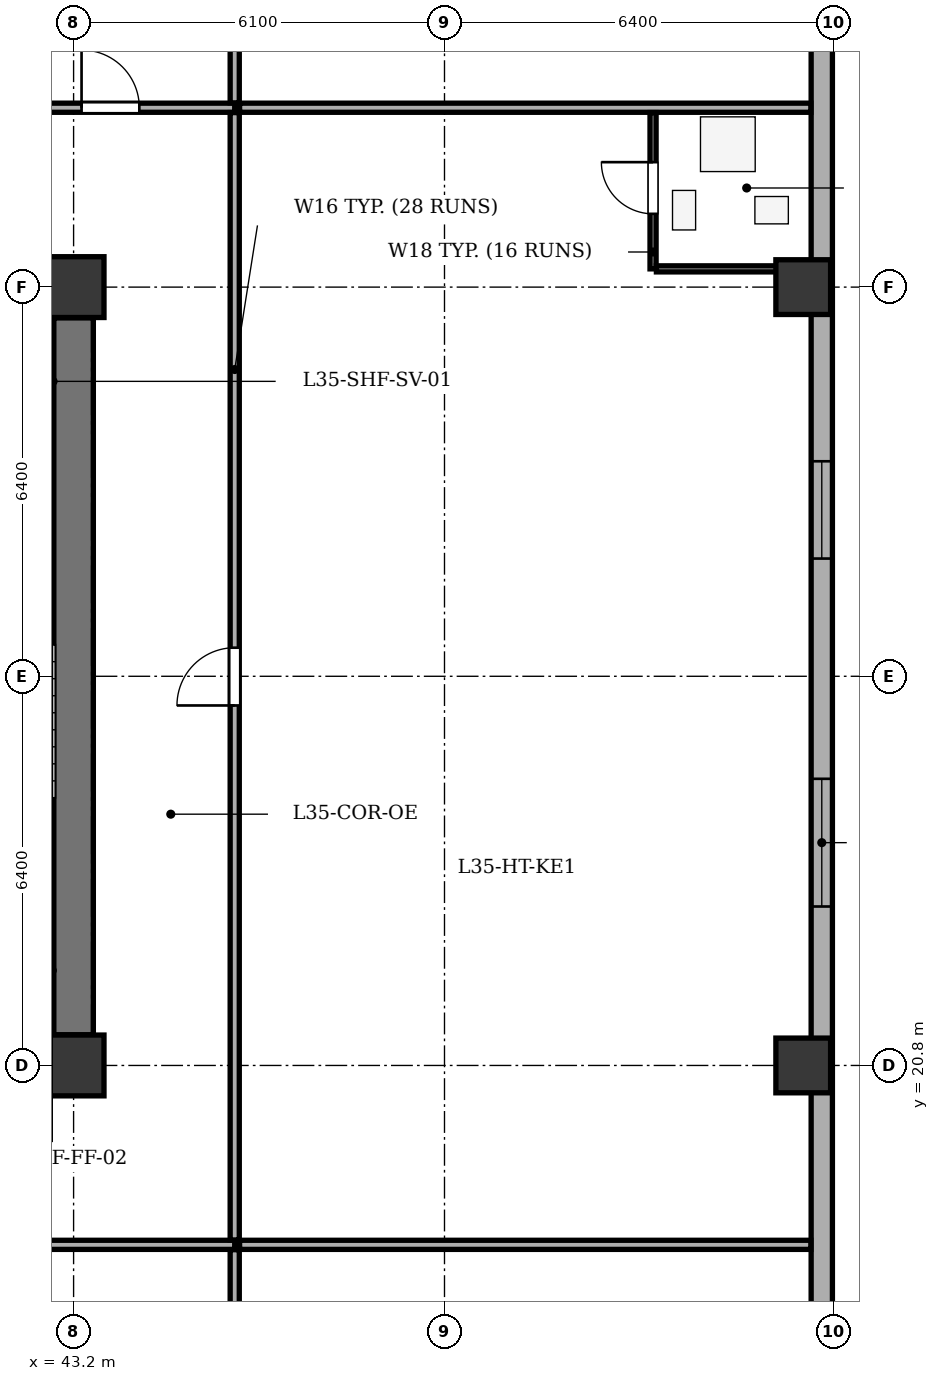
"""IFC4 building model, lengths in metres.
Left out: names, types, materials, properties, quantities, classifications, styles, units other than length and angle.
Written with IfcOpenShell. Run it as: python <this file> out.ifc"""

import sys

from ifc_helpers import new_model, si_unit, direction, frame, frame_2d, origin, origin_2d, place, context, subcontext, project, spatial, rectangle, extrude, element, fill, save


model = new_model("IFC4")
c1 = context("Model", 3, precision=1e-05, world=origin(), true_north=direction((0.0, 1.0)))
c2 = subcontext(c1, "Body", "Model", "MODEL_VIEW")
j1 = project(units=[si_unit("LENGTHUNIT", "METRE"), si_unit("PLANEANGLEUNIT", "RADIAN")], contexts=[c1])
p1 = place(None, origin())
s1 = spatial("IfcSite", under=j1, at=p1, CompositionType="ELEMENT")
p2 = place(p1, origin())
s2 = spatial("IfcBuilding", under=s1, at=p2, CompositionType="ELEMENT")
p3 = place(p2, frame((0.0, 0.0, 141.3)))
s3 = spatial("IfcBuildingStorey", under=s2, at=p3, CompositionType="ELEMENT", Elevation=141.3)
for number, where, z_axis, x_axis in (
    (1, (43.2, 20.8, 0.0), (0.0, 0.0, 1.0), (1.0, 0.0, 0.0)),
    (2, (43.2, 33.6, 0.0), (0.0, 0.0, 1.0), (1.0, 0.0, 0.0)),
):
    element("IfcColumn", number, at=place(p3, frame(where, z_axis=z_axis, x_axis=x_axis)), inside=s3, PredefinedType="COLUMN", context=c2, shape_type="SweptSolid", body=[
        extrude(rectangle(XDim=1.0, YDim=1.0, at=origin_2d()), origin(), (0.0, 0.0, 1.0), 3.5),
    ])
for number, where, z_axis, x_axis in (
    (3, (55.2, 20.8, 0.0), (0.0, 0.0, 1.0), (1.0, 0.0, 0.0)),
    (4, (55.2, 33.6, 0.0), (0.0, 0.0, 1.0), (1.0, 0.0, 0.0)),
):
    element("IfcColumn", number, at=place(p3, frame(where, z_axis=z_axis, x_axis=x_axis)), inside=s3, PredefinedType="COLUMN", context=c2, shape_type="SweptSolid", body=[
        extrude(rectangle(XDim=0.9, YDim=0.9, at=origin_2d()), origin(), (0.0, 0.0, 1.0), 3.5),
    ])
p4 = place(p3, frame((55.505, 41.5, 0.0), z_axis=(0.0, 0.0, 1.0), x_axis=(0.0, -1.0, 0.0)))
e5 = element("IfcWall", 5, at=p4, inside=s3, PredefinedType="STANDARD", context=c2, shape_type="SweptSolid", body=[
    extrude(rectangle(XDim=35.0, YDim=0.35, at=frame_2d((17.5, 0.0))), origin(), (0.0, 0.0, 1.0), 2.785),
])
p5 = place(p4, frame((1.813, 0.0, 0.75)))
e6 = element("IfcOpeningElement", 6, at=p5, cuts=e5, PredefinedType="OPENING", context=c2, shape_type="SweptSolid", body=[
    extrude(rectangle(XDim=1.6, YDim=1.75, at=frame_2d((0.8, 0.875))), frame((0.0, 0.185, 0.0), z_axis=(0.0, -1.0, 0.0), x_axis=(1.0, 0.0, 0.0)), (0.0, 0.0, 1.0), 0.37),
])
p6 = place(p4, frame((10.764, 0.0, 0.75)))
e7 = element("IfcOpeningElement", 7, at=p6, cuts=e5, PredefinedType="OPENING", context=c2, shape_type="SweptSolid", body=[
    extrude(rectangle(XDim=1.6, YDim=1.75, at=frame_2d((0.8, 0.875))), frame((0.0, 0.185, 0.0), z_axis=(0.0, -1.0, 0.0), x_axis=(1.0, 0.0, 0.0)), (0.0, 0.0, 1.0), 0.37),
])
p7 = place(p4, frame((15.986, 0.0, 0.75)))
e8 = element("IfcOpeningElement", 8, at=p7, cuts=e5, PredefinedType="OPENING", context=c2, shape_type="SweptSolid", body=[
    extrude(rectangle(XDim=2.1, YDim=1.75, at=frame_2d((1.05, 0.875))), frame((0.0, 0.185, 0.0), z_axis=(0.0, -1.0, 0.0), x_axis=(1.0, 0.0, 0.0)), (0.0, 0.0, 1.0), 0.37),
])
p8 = place(p4, frame((25.97, 0.0, 0.75)))
e9 = element("IfcOpeningElement", 9, at=p8, cuts=e5, PredefinedType="OPENING", context=c2, shape_type="SweptSolid", body=[
    extrude(rectangle(XDim=1.6, YDim=1.75, at=frame_2d((0.8, 0.875))), frame((0.0, 0.185, 0.0), z_axis=(0.0, -1.0, 0.0), x_axis=(1.0, 0.0, 0.0)), (0.0, 0.0, 1.0), 0.37),
])
p9 = place(p4, frame((30.555, 0.0, 0.75)))
e10 = element("IfcOpeningElement", 10, at=p9, cuts=e5, PredefinedType="OPENING", context=c2, shape_type="SweptSolid", body=[
    extrude(rectangle(XDim=2.1, YDim=1.75, at=frame_2d((1.05, 0.875))), frame((0.0, 0.185, 0.0), z_axis=(0.0, -1.0, 0.0), x_axis=(1.0, 0.0, 0.0)), (0.0, 0.0, 1.0), 0.37),
])
p10 = place(p3, frame((43.2, 21.305, 0.0), z_axis=(0.0, 0.0, 1.0), x_axis=(0.0, 1.0, 0.0)))
e11 = element("IfcWall", 11, at=p10, inside=s3, PredefinedType="SHEAR", context=c2, shape_type="SweptSolid", body=[
    extrude(rectangle(XDim=11.79, YDim=0.65, at=frame_2d((5.895, 0.0))), origin(), (0.0, 0.0, 1.0), 3.2),
])
for number, where, z_axis, x_axis in (
    (12, (39.69, 23.57, 0.0), (0.0, 0.0, 1.0), (1.0, 0.0, 0.0)),
    (13, (39.69, 30.83, 0.0), (0.0, 0.0, 1.0), (1.0, 0.0, 0.0)),
):
    element("IfcWall", number, at=place(p3, frame(where, z_axis=z_axis, x_axis=x_axis)), inside=s3, PredefinedType="SHEAR", context=c2, shape_type="SweptSolid", body=[
        extrude(rectangle(XDim=3.175, YDim=0.25, at=frame_2d((1.587, 0.0))), origin(), (0.0, 0.0, 1.0), 3.2),
    ])
p11 = place(p3, frame((30.252, 17.85, 0.0), z_axis=(0.0, 0.0, 1.0), x_axis=(1.0, 0.0, 0.0)))
e14 = element("IfcWall", 14, at=p11, inside=s3, PredefinedType="PARTITIONING", context=c2, shape_type="SweptSolid", body=[
    extrude(rectangle(XDim=15.598, YDim=0.15, at=frame_2d((7.799, 0.0))), origin(), (0.0, 0.0, 1.0), 3.2),
])
p12 = place(p11, frame((7.239, 0.0, 0.0)))
e15 = element("IfcOpeningElement", 15, at=p12, cuts=e14, PredefinedType="OPENING", context=c2, shape_type="SweptSolid", body=[
    extrude(rectangle(XDim=1.0, YDim=2.1, at=frame_2d((0.5, 1.05))), frame((0.0, 0.085, 0.0), z_axis=(0.0, -1.0, 0.0), x_axis=(1.0, 0.0, 0.0)), (0.0, 0.0, 1.0), 0.17),
])
p13 = place(p3, frame((45.85, 1.875, 0.0), z_axis=(0.0, 0.0, 1.0), x_axis=(0.0, 1.0, 0.0)))
e16 = element("IfcWall", 16, at=p13, inside=s3, PredefinedType="PARTITIONING", context=c2, shape_type="SweptSolid", body=[
    extrude(rectangle(XDim=15.895, YDim=0.15, at=frame_2d((7.948, 0.0))), origin(), (0.0, 0.0, 1.0), 3.2),
])
p14 = place(p3, frame((41.771, 36.55, 0.0), z_axis=(0.0, 0.0, 1.0), x_axis=(1.0, 0.0, 0.0)))
e17 = element("IfcWall", 17, at=p14, inside=s3, PredefinedType="PARTITIONING", context=c2, shape_type="SweptSolid", body=[
    extrude(rectangle(XDim=4.079, YDim=0.15, at=frame_2d((2.04, 0.0))), origin(), (0.0, 0.0, 1.0), 3.2),
])
p15 = place(p14, frame((1.56, 0.0, 0.0)))
e18 = element("IfcOpeningElement", 18, at=p15, cuts=e17, PredefinedType="OPENING", context=c2, shape_type="SweptSolid", body=[
    extrude(rectangle(XDim=0.95, YDim=2.1, at=frame_2d((0.475, 1.05))), frame((0.0, 0.085, 0.0), z_axis=(0.0, -1.0, 0.0), x_axis=(1.0, 0.0, 0.0)), (0.0, 0.0, 1.0), 0.17),
])
p16 = place(p3, frame((45.85, 36.63, 0.0), z_axis=(0.0, 0.0, 1.0), x_axis=(0.0, 1.0, 0.0)))
e19 = element("IfcWall", 19, at=p16, inside=s3, PredefinedType="PARTITIONING", context=c2, shape_type="SweptSolid", body=[
    extrude(rectangle(XDim=9.495, YDim=0.15, at=frame_2d((4.748, 0.0))), origin(), (0.0, 0.0, 1.0), 3.2),
])
for number, where, z_axis, x_axis in (
    (20, (45.93, 17.85, 0.0), (0.0, 0.0, 1.0), (1.0, 0.0, 0.0)),
    (21, (45.93, 36.55, 0.0), (0.0, 0.0, 1.0), (1.0, 0.0, 0.0)),
):
    element("IfcWall", number, at=place(p3, frame(where, z_axis=z_axis, x_axis=x_axis)), inside=s3, PredefinedType="PARTITIONING", context=c2, shape_type="SweptSolid", body=[
        extrude(rectangle(XDim=9.395, YDim=0.15, at=frame_2d((4.698, 0.0))), origin(), (0.0, 0.0, 1.0), 3.2),
    ])
p17 = place(p3, frame((45.85, 17.93, 0.0), z_axis=(0.0, 0.0, 1.0), x_axis=(0.0, 1.0, 0.0)))
e22 = element("IfcWall", 22, at=p17, inside=s3, PredefinedType="PARTITIONING", context=c2, shape_type="SweptSolid", body=[
    extrude(rectangle(XDim=18.54, YDim=0.15, at=frame_2d((9.27, 0.0))), origin(), (0.0, 0.0, 1.0), 3.2),
])
p18 = place(p17, frame((8.79, 0.0, 0.0)))
e23 = element("IfcOpeningElement", 23, at=p18, cuts=e22, PredefinedType="OPENING", context=c2, shape_type="SweptSolid", body=[
    extrude(rectangle(XDim=0.95, YDim=2.1, at=frame_2d((0.475, 1.05))), frame((0.0, 0.085, 0.0), z_axis=(0.0, -1.0, 0.0), x_axis=(1.0, 0.0, 0.0)), (0.0, 0.0, 1.0), 0.17),
])
p19 = place(p3, frame((52.73, 33.9, 0.0), z_axis=(0.0, 0.0, 1.0), x_axis=(0.0, 1.0, 0.0)))
e24 = element("IfcWall", 24, at=p19, inside=s3, PredefinedType="PARTITIONING", context=c2, shape_type="SweptSolid", body=[
    extrude(rectangle(XDim=2.57, YDim=0.1, at=frame_2d((1.285, 0.0))), origin(), (0.0, 0.0, 1.0), 3.2),
])
p20 = place(p19, frame((0.905, 0.0, 0.0)))
e25 = element("IfcOpeningElement", 25, at=p20, cuts=e24, PredefinedType="OPENING", context=c2, shape_type="SweptSolid", body=[
    extrude(rectangle(XDim=0.85, YDim=2.05, at=frame_2d((0.425, 1.025))), frame((0.0, 0.06, 0.0), z_axis=(0.0, -1.0, 0.0), x_axis=(1.0, 0.0, 0.0)), (0.0, 0.0, 1.0), 0.12),
])
p21 = place(p3, frame((52.785, 33.9, 0.0), z_axis=(0.0, 0.0, 1.0), x_axis=(1.0, 0.0, 0.0)))
e26 = element("IfcWall", 26, at=p21, inside=s3, PredefinedType="PARTITIONING", context=c2, shape_type="SweptSolid", body=[
    extrude(rectangle(XDim=2.54, YDim=0.1, at=frame_2d((1.27, 0.0))), origin(), (0.0, 0.0, 1.0), 2.535),
])
p22 = place(p6, origin())
e27 = element("IfcWindow", 27, at=p22, inside=s3, PartitioningType="SINGLE_PANEL", PredefinedType="WINDOW", context=c2, shape_type="SweptSolid", body=[
    extrude(rectangle(XDim=1.6, YDim=1.75, at=frame_2d((0.8, 0.875))), frame((0.0, -0.01, 0.0), z_axis=(0.0, -1.0, 0.0), x_axis=(1.0, 0.0, 0.0)), (0.0, 0.0, 1.0), 0.06),
])
fill(e7, e27)
p23 = place(p7, origin())
e28 = element("IfcWindow", 28, at=p23, inside=s3, PartitioningType="SINGLE_PANEL", PredefinedType="WINDOW", context=c2, shape_type="SweptSolid", body=[
    extrude(rectangle(XDim=2.1, YDim=1.75, at=frame_2d((1.05, 0.875))), frame((0.0, -0.01, 0.0), z_axis=(0.0, -1.0, 0.0), x_axis=(1.0, 0.0, 0.0)), (0.0, 0.0, 1.0), 0.06),
])
fill(e8, e28)
p24 = place(p15, origin())
e29 = element("IfcDoor", 29, at=p24, inside=s3, OperationType="SINGLE_SWING_LEFT", PredefinedType="DOOR", context=c2, shape_type="SweptSolid", body=[
    extrude(rectangle(XDim=0.95, YDim=2.1, at=frame_2d((0.475, 1.05))), frame((0.0, 0.025, 0.0), z_axis=(0.0, -1.0, 0.0), x_axis=(1.0, 0.0, 0.0)), (0.0, 0.0, 1.0), 0.05),
])
fill(e18, e29)
p25 = place(p20, origin())
e30 = element("IfcDoor", 30, at=p25, inside=s3, OperationType="SINGLE_SWING_RIGHT", PredefinedType="DOOR", context=c2, shape_type="SweptSolid", body=[
    extrude(rectangle(XDim=0.85, YDim=2.05, at=frame_2d((0.425, 1.025))), frame((0.0, 0.025, 0.0), z_axis=(0.0, -1.0, 0.0), x_axis=(1.0, 0.0, 0.0)), (0.0, 0.0, 1.0), 0.05),
])
fill(e25, e30)
p26 = place(p18, origin())
e31 = element("IfcDoor", 31, at=p26, inside=s3, OperationType="SINGLE_SWING_LEFT", PredefinedType="DOOR", context=c2, shape_type="SweptSolid", body=[
    extrude(rectangle(XDim=0.95, YDim=2.1, at=frame_2d((0.475, 1.05))), frame((0.0, 0.025, 0.0), z_axis=(0.0, -1.0, 0.0), x_axis=(1.0, 0.0, 0.0)), (0.0, 0.0, 1.0), 0.05),
])
fill(e23, e31)
save(model, sys.argv[1])
